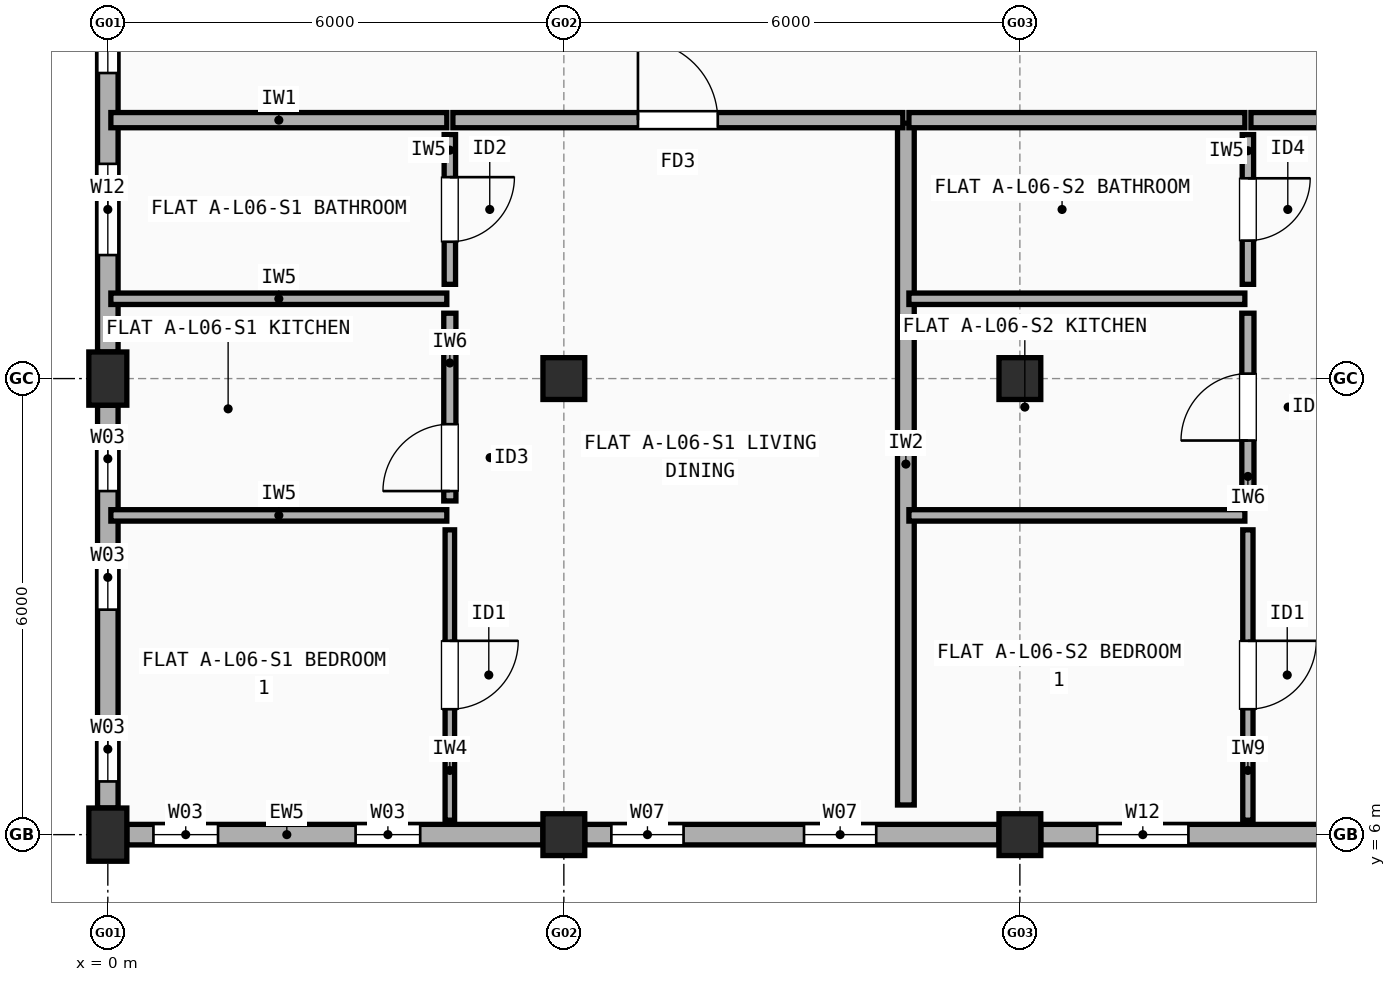
"""IFC4 building model, lengths in metres.
Left out: names, types, materials, properties, quantities, classifications, styles, units other than length and angle.
Written with IfcOpenShell. Run it as: python <this file> out.ifc"""

import sys

from ifc_helpers import new_model, si_unit, direction, frame, frame_2d, origin, origin_2d, place, context, subcontext, project, spatial, rectangle, extrude, element, fill, save


model = new_model("IFC4")
c1 = context("Model", 3, precision=1e-05, world=origin(), true_north=direction((0.0, 1.0)))
c2 = subcontext(c1, "Body", "Model", "MODEL_VIEW")
j1 = project(units=[si_unit("LENGTHUNIT", "METRE"), si_unit("PLANEANGLEUNIT", "RADIAN")], contexts=[c1])
p1 = place(None, origin())
s1 = spatial("IfcSite", under=j1, at=p1, CompositionType="ELEMENT")
p2 = place(p1, origin())
s2 = spatial("IfcBuilding", under=s1, at=p2, CompositionType="ELEMENT")
p3 = place(p2, frame((0.0, 0.0, 20.5)))
s3 = spatial("IfcBuildingStorey", under=s2, at=p3, CompositionType="ELEMENT", Elevation=20.5)
for number, where, z_axis, x_axis in (
    (1, (0.0, 6.0, 0.0), (0.0, 0.0, 1.0), (1.0, 0.0, 0.0)),
    (2, (0.0, 12.0, 0.0), (0.0, 0.0, 1.0), (1.0, 0.0, 0.0)),
):
    element("IfcColumn", number, at=place(p3, frame(where, z_axis=z_axis, x_axis=x_axis)), inside=s3, PredefinedType="COLUMN", context=c2, shape_type="SweptSolid", body=[
        extrude(rectangle(XDim=0.5, YDim=0.7, at=origin_2d()), origin(), (0.0, 0.0, 1.0), 2.97),
    ])
for number, where, z_axis, x_axis in (
    (3, (6.0, 6.0, 0.0), (0.0, 0.0, 1.0), (1.0, 0.0, 0.0)),
    (4, (6.0, 12.0, 0.0), (0.0, 0.0, 1.0), (1.0, 0.0, 0.0)),
    (5, (12.0, 6.0, 0.0), (0.0, 0.0, 1.0), (1.0, 0.0, 0.0)),
    (6, (12.0, 12.0, 0.0), (0.0, 0.0, 1.0), (1.0, 0.0, 0.0)),
):
    element("IfcColumn", number, at=place(p3, frame(where, z_axis=z_axis, x_axis=x_axis)), inside=s3, PredefinedType="COLUMN", context=c2, shape_type="SweptSolid", body=[
        extrude(rectangle(XDim=0.55, YDim=0.55, at=origin_2d()), origin(), (0.0, 0.0, 1.0), 2.97),
    ])
p4 = place(p3, frame((0.25, 6.0, 0.0), z_axis=(0.0, 0.0, 1.0), x_axis=(1.0, 0.0, 0.0)))
e7 = element("IfcWall", 7, at=p4, inside=s3, PredefinedType="STANDARD", context=c2, shape_type="SweptSolid", body=[
    extrude(rectangle(XDim=5.475, YDim=0.27, at=frame_2d((2.738, 0.0))), origin(), (0.0, 0.0, 1.0), 2.452),
])
p5 = place(p4, frame((0.35, 0.0, 0.9)))
e8 = element("IfcOpeningElement", 8, at=p5, cuts=e7, PredefinedType="OPENING", context=c2, shape_type="SweptSolid", body=[
    extrude(rectangle(XDim=0.85, YDim=1.25, at=frame_2d((0.425, 0.625))), frame((0.0, 0.145, 0.0), z_axis=(0.0, -1.0, 0.0), x_axis=(1.0, 0.0, 0.0)), (0.0, 0.0, 1.0), 0.29),
])
p6 = place(p4, frame((3.01, 0.0, 0.9)))
e9 = element("IfcOpeningElement", 9, at=p6, cuts=e7, PredefinedType="OPENING", context=c2, shape_type="SweptSolid", body=[
    extrude(rectangle(XDim=0.85, YDim=1.25, at=frame_2d((0.425, 0.625))), frame((0.0, 0.145, 0.0), z_axis=(0.0, -1.0, 0.0), x_axis=(1.0, 0.0, 0.0)), (0.0, 0.0, 1.0), 0.29),
])
p7 = place(p3, frame((6.275, 6.0, 0.0), z_axis=(0.0, 0.0, 1.0), x_axis=(1.0, 0.0, 0.0)))
e10 = element("IfcWall", 10, at=p7, inside=s3, PredefinedType="STANDARD", context=c2, shape_type="SweptSolid", body=[
    extrude(rectangle(XDim=5.45, YDim=0.27, at=frame_2d((2.725, 0.0))), origin(), (0.0, 0.0, 1.0), 2.452),
])
p8 = place(p7, frame((0.35, 0.0, 0.9)))
e11 = element("IfcOpeningElement", 11, at=p8, cuts=e10, PredefinedType="OPENING", context=c2, shape_type="SweptSolid", body=[
    extrude(rectangle(XDim=0.95, YDim=1.35, at=frame_2d((0.475, 0.675))), frame((0.0, 0.145, 0.0), z_axis=(0.0, -1.0, 0.0), x_axis=(1.0, 0.0, 0.0)), (0.0, 0.0, 1.0), 0.29),
])
p9 = place(p7, frame((2.885, 0.0, 0.9)))
e12 = element("IfcOpeningElement", 12, at=p9, cuts=e10, PredefinedType="OPENING", context=c2, shape_type="SweptSolid", body=[
    extrude(rectangle(XDim=0.95, YDim=1.35, at=frame_2d((0.475, 0.675))), frame((0.0, 0.145, 0.0), z_axis=(0.0, -1.0, 0.0), x_axis=(1.0, 0.0, 0.0)), (0.0, 0.0, 1.0), 0.29),
])
p10 = place(p3, frame((12.275, 6.0, 0.0), z_axis=(0.0, 0.0, 1.0), x_axis=(1.0, 0.0, 0.0)))
e13 = element("IfcWall", 13, at=p10, inside=s3, PredefinedType="STANDARD", context=c2, shape_type="SweptSolid", body=[
    extrude(rectangle(XDim=5.45, YDim=0.27, at=frame_2d((2.725, 0.0))), origin(), (0.0, 0.0, 1.0), 2.452),
])
p11 = place(p10, frame((0.742, 0.0, 0.9)))
e14 = element("IfcOpeningElement", 14, at=p11, cuts=e13, PredefinedType="OPENING", context=c2, shape_type="SweptSolid", body=[
    extrude(rectangle(XDim=1.2, YDim=1.35, at=frame_2d((0.6, 0.675))), frame((0.0, 0.145, 0.0), z_axis=(0.0, -1.0, 0.0), x_axis=(1.0, 0.0, 0.0)), (0.0, 0.0, 1.0), 0.29),
])
p12 = place(p10, frame((3.708, 0.0, 0.9)))
e15 = element("IfcOpeningElement", 15, at=p12, cuts=e13, PredefinedType="OPENING", context=c2, shape_type="SweptSolid", body=[
    extrude(rectangle(XDim=0.8, YDim=1.2, at=frame_2d((0.4, 0.6))), frame((0.0, 0.145, 0.0), z_axis=(0.0, -1.0, 0.0), x_axis=(1.0, 0.0, 0.0)), (0.0, 0.0, 1.0), 0.29),
])
p13 = place(p3, frame((0.0, 17.65, 0.0), z_axis=(0.0, 0.0, 1.0), x_axis=(0.0, -1.0, 0.0)))
e16 = element("IfcWall", 16, at=p13, inside=s3, PredefinedType="STANDARD", context=c2, shape_type="SweptSolid", body=[
    extrude(rectangle(XDim=5.3, YDim=0.27, at=frame_2d((2.65, 0.0))), origin(), (0.0, 0.0, 1.0), 2.452),
])
p14 = place(p13, frame((0.58, 0.0, 0.9)))
e17 = element("IfcOpeningElement", 17, at=p14, cuts=e16, PredefinedType="OPENING", context=c2, shape_type="SweptSolid", body=[
    extrude(rectangle(XDim=1.05, YDim=1.35, at=frame_2d((0.525, 0.675))), frame((0.0, 0.145, 0.0), z_axis=(0.0, -1.0, 0.0), x_axis=(1.0, 0.0, 0.0)), (0.0, 0.0, 1.0), 0.29),
])
p15 = place(p13, frame((2.825, 0.0, 0.9)))
e18 = element("IfcOpeningElement", 18, at=p15, cuts=e16, PredefinedType="OPENING", context=c2, shape_type="SweptSolid", body=[
    extrude(rectangle(XDim=1.2, YDim=1.35, at=frame_2d((0.6, 0.675))), frame((0.0, 0.145, 0.0), z_axis=(0.0, -1.0, 0.0), x_axis=(1.0, 0.0, 0.0)), (0.0, 0.0, 1.0), 0.29),
])
p16 = place(p3, frame((0.0, 11.65, 0.0), z_axis=(0.0, 0.0, 1.0), x_axis=(0.0, -1.0, 0.0)))
e19 = element("IfcWall", 19, at=p16, inside=s3, PredefinedType="STANDARD", context=c2, shape_type="SweptSolid", body=[
    extrude(rectangle(XDim=5.3, YDim=0.27, at=frame_2d((2.65, 0.0))), origin(), (0.0, 0.0, 1.0), 2.452),
])
p17 = place(p16, frame((0.28, 0.0, 0.9)))
e20 = element("IfcOpeningElement", 20, at=p17, cuts=e19, PredefinedType="OPENING", context=c2, shape_type="SweptSolid", body=[
    extrude(rectangle(XDim=0.85, YDim=1.25, at=frame_2d((0.425, 0.625))), frame((0.0, 0.145, 0.0), z_axis=(0.0, -1.0, 0.0), x_axis=(1.0, 0.0, 0.0)), (0.0, 0.0, 1.0), 0.29),
])
p18 = place(p16, frame((1.84, 0.0, 0.9)))
e21 = element("IfcOpeningElement", 21, at=p18, cuts=e19, PredefinedType="OPENING", context=c2, shape_type="SweptSolid", body=[
    extrude(rectangle(XDim=0.85, YDim=1.25, at=frame_2d((0.425, 0.625))), frame((0.0, 0.145, 0.0), z_axis=(0.0, -1.0, 0.0), x_axis=(1.0, 0.0, 0.0)), (0.0, 0.0, 1.0), 0.29),
])
p19 = place(p16, frame((4.1, 0.0, 0.9)))
e22 = element("IfcOpeningElement", 22, at=p19, cuts=e19, PredefinedType="OPENING", context=c2, shape_type="SweptSolid", body=[
    extrude(rectangle(XDim=0.85, YDim=1.25, at=frame_2d((0.425, 0.625))), frame((0.0, 0.145, 0.0), z_axis=(0.0, -1.0, 0.0), x_axis=(1.0, 0.0, 0.0)), (0.0, 0.0, 1.0), 0.29),
])
p20 = place(p3, frame((10.5, 6.39, 0.0), z_axis=(0.0, 0.0, 1.0), x_axis=(0.0, 1.0, 0.0)))
e23 = element("IfcWall", 23, at=p20, inside=s3, PredefinedType="SOLIDWALL", context=c2, shape_type="SweptSolid", body=[
    extrude(rectangle(XDim=8.97, YDim=0.22, at=frame_2d((4.485, 0.0))), origin(), (0.0, 0.0, 1.0), 2.508),
])
p21 = place(p3, frame((0.04, 15.4, 0.0), z_axis=(0.0, 0.0, 1.0), x_axis=(1.0, 0.0, 0.0)))
e24 = element("IfcWall", 24, at=p21, inside=s3, PredefinedType="SOLIDWALL", context=c2, shape_type="SweptSolid", body=[
    extrude(rectangle(XDim=4.42, YDim=0.2, at=frame_2d((2.21, 0.0))), origin(), (0.0, 0.0, 1.0), 2.452),
])
p22 = place(p3, frame((4.54, 15.4, 0.0), z_axis=(0.0, 0.0, 1.0), x_axis=(1.0, 0.0, 0.0)))
e25 = element("IfcWall", 25, at=p22, inside=s3, PredefinedType="SOLIDWALL", context=c2, shape_type="SweptSolid", body=[
    extrude(rectangle(XDim=5.92, YDim=0.2, at=frame_2d((2.96, 0.0))), origin(), (0.0, 0.0, 1.0), 2.548),
])
p23 = place(p22, frame((2.435, 0.0, 0.0)))
e26 = element("IfcOpeningElement", 26, at=p23, cuts=e25, PredefinedType="OPENING", context=c2, shape_type="SweptSolid", body=[
    extrude(rectangle(XDim=1.05, YDim=2.15, at=frame_2d((0.525, 1.075))), frame((0.0, 0.11, 0.0), z_axis=(0.0, -1.0, 0.0), x_axis=(1.0, 0.0, 0.0)), (0.0, 0.0, 1.0), 0.22),
])
p24 = place(p3, frame((4.5, 6.19, 0.0), z_axis=(0.0, 0.0, 1.0), x_axis=(0.0, 1.0, 0.0)))
e27 = element("IfcWall", 27, at=p24, inside=s3, PredefinedType="PARTITIONING", context=c2, shape_type="SweptSolid", body=[
    extrude(rectangle(XDim=3.82, YDim=0.125, at=frame_2d((1.91, 0.0))), origin(), (0.0, 0.0, 1.0), 2.97),
])
p25 = place(p24, frame((1.46, 0.0, 0.0)))
e28 = element("IfcOpeningElement", 28, at=p25, cuts=e27, PredefinedType="OPENING", context=c2, shape_type="SweptSolid", body=[
    extrude(rectangle(XDim=0.9, YDim=2.1, at=frame_2d((0.45, 1.05))), frame((0.0, 0.073, 0.0), z_axis=(0.0, -1.0, 0.0), x_axis=(1.0, 0.0, 0.0)), (0.0, 0.0, 1.0), 0.145),
])
p26 = place(p3, frame((4.5, 10.39, 0.0), z_axis=(0.0, 0.0, 1.0), x_axis=(0.0, 1.0, 0.0)))
e29 = element("IfcWall", 29, at=p26, inside=s3, PredefinedType="PLUMBINGWALL", context=c2, shape_type="SweptSolid", body=[
    extrude(rectangle(XDim=2.47, YDim=0.16, at=frame_2d((1.235, 0.0))), origin(), (0.0, 0.0, 1.0), 2.548),
])
p27 = place(p26, frame((0.13, 0.0, 0.0)))
e30 = element("IfcOpeningElement", 30, at=p27, cuts=e29, PredefinedType="OPENING", context=c2, shape_type="SweptSolid", body=[
    extrude(rectangle(XDim=0.88, YDim=2.1, at=frame_2d((0.44, 1.05))), frame((0.0, 0.09, 0.0), z_axis=(0.0, -1.0, 0.0), x_axis=(1.0, 0.0, 0.0)), (0.0, 0.0, 1.0), 0.18),
])
p28 = place(p3, frame((4.5, 13.24, 0.0), z_axis=(0.0, 0.0, 1.0), x_axis=(0.0, 1.0, 0.0)))
e31 = element("IfcWall", 31, at=p28, inside=s3, PredefinedType="PARTITIONING", context=c2, shape_type="SweptSolid", body=[
    extrude(rectangle(XDim=1.97, YDim=0.15, at=frame_2d((0.985, 0.0))), origin(), (0.0, 0.0, 1.0), 2.97),
])
p29 = place(p28, frame((0.56, 0.0, 0.0)))
e32 = element("IfcOpeningElement", 32, at=p29, cuts=e31, PredefinedType="OPENING", context=c2, shape_type="SweptSolid", body=[
    extrude(rectangle(XDim=0.85, YDim=2.1, at=frame_2d((0.425, 1.05))), frame((0.0, 0.085, 0.0), z_axis=(0.0, -1.0, 0.0), x_axis=(1.0, 0.0, 0.0)), (0.0, 0.0, 1.0), 0.17),
])
for number, where, z_axis, x_axis in (
    (33, (0.04, 10.2, 0.0), (0.0, 0.0, 1.0), (1.0, 0.0, 0.0)),
    (34, (0.04, 13.05, 0.0), (0.0, 0.0, 1.0), (1.0, 0.0, 0.0)),
):
    element("IfcWall", number, at=place(p3, frame(where, z_axis=z_axis, x_axis=x_axis)), inside=s3, PredefinedType="PARTITIONING", context=c2, shape_type="SweptSolid", body=[
        extrude(rectangle(XDim=4.42, YDim=0.15, at=frame_2d((2.21, 0.0))), origin(), (0.0, 0.0, 1.0), 2.452),
    ])
p30 = place(p3, frame((10.54, 15.4, 0.0), z_axis=(0.0, 0.0, 1.0), x_axis=(1.0, 0.0, 0.0)))
e35 = element("IfcWall", 35, at=p30, inside=s3, PredefinedType="SOLIDWALL", context=c2, shape_type="SweptSolid", body=[
    extrude(rectangle(XDim=4.42, YDim=0.2, at=frame_2d((2.21, 0.0))), origin(), (0.0, 0.0, 1.0), 2.548),
])
p31 = place(p3, frame((15.04, 15.4, 0.0), z_axis=(0.0, 0.0, 1.0), x_axis=(1.0, 0.0, 0.0)))
e36 = element("IfcWall", 36, at=p31, inside=s3, PredefinedType="SOLIDWALL", context=c2, shape_type="SweptSolid", body=[
    extrude(rectangle(XDim=5.92, YDim=0.2, at=frame_2d((2.96, 0.0))), origin(), (0.0, 0.0, 1.0), 2.508),
])
p32 = place(p31, frame((2.46, 0.0, 0.0)))
e37 = element("IfcOpeningElement", 37, at=p32, cuts=e36, PredefinedType="OPENING", context=c2, shape_type="SweptSolid", body=[
    extrude(rectangle(XDim=1.0, YDim=2.15, at=frame_2d((0.5, 1.075))), frame((0.0, 0.11, 0.0), z_axis=(0.0, -1.0, 0.0), x_axis=(1.0, 0.0, 0.0)), (0.0, 0.0, 1.0), 0.22),
])
p33 = place(p3, frame((15.0, 6.19, 0.0), z_axis=(0.0, 0.0, 1.0), x_axis=(0.0, 1.0, 0.0)))
e38 = element("IfcWall", 38, at=p33, inside=s3, PredefinedType="PARTITIONING", context=c2, shape_type="SweptSolid", body=[
    extrude(rectangle(XDim=3.82, YDim=0.135, at=frame_2d((1.91, 0.0))), origin(), (0.0, 0.0, 1.0), 2.97),
])
p34 = place(p33, frame((1.46, 0.0, 0.0)))
e39 = element("IfcOpeningElement", 39, at=p34, cuts=e38, PredefinedType="OPENING", context=c2, shape_type="SweptSolid", body=[
    extrude(rectangle(XDim=0.9, YDim=2.1, at=frame_2d((0.45, 1.05))), frame((0.0, 0.077, 0.0), z_axis=(0.0, -1.0, 0.0), x_axis=(1.0, 0.0, 0.0)), (0.0, 0.0, 1.0), 0.155),
])
p35 = place(p3, frame((15.0, 10.39, 0.0), z_axis=(0.0, 0.0, 1.0), x_axis=(0.0, 1.0, 0.0)))
e40 = element("IfcWall", 40, at=p35, inside=s3, PredefinedType="PLUMBINGWALL", context=c2, shape_type="SweptSolid", body=[
    extrude(rectangle(XDim=2.47, YDim=0.16, at=frame_2d((1.235, 0.0))), origin(), (0.0, 0.0, 1.0), 2.408),
])
p36 = place(p35, frame((0.795, 0.0, 0.0)))
e41 = element("IfcOpeningElement", 41, at=p36, cuts=e40, PredefinedType="OPENING", context=c2, shape_type="SweptSolid", body=[
    extrude(rectangle(XDim=0.88, YDim=2.1, at=frame_2d((0.44, 1.05))), frame((0.0, 0.09, 0.0), z_axis=(0.0, -1.0, 0.0), x_axis=(1.0, 0.0, 0.0)), (0.0, 0.0, 1.0), 0.18),
])
p37 = place(p3, frame((15.0, 13.24, 0.0), z_axis=(0.0, 0.0, 1.0), x_axis=(0.0, 1.0, 0.0)))
e42 = element("IfcWall", 42, at=p37, inside=s3, PredefinedType="PARTITIONING", context=c2, shape_type="SweptSolid", body=[
    extrude(rectangle(XDim=1.97, YDim=0.15, at=frame_2d((0.985, 0.0))), origin(), (0.0, 0.0, 1.0), 2.97),
])
p38 = place(p37, frame((0.575, 0.0, 0.0)))
e43 = element("IfcOpeningElement", 43, at=p38, cuts=e42, PredefinedType="OPENING", context=c2, shape_type="SweptSolid", body=[
    extrude(rectangle(XDim=0.82, YDim=2.08, at=frame_2d((0.41, 1.04))), frame((0.0, 0.085, 0.0), z_axis=(0.0, -1.0, 0.0), x_axis=(1.0, 0.0, 0.0)), (0.0, 0.0, 1.0), 0.17),
])
p39 = place(p3, frame((10.54, 10.2, 0.0), z_axis=(0.0, 0.0, 1.0), x_axis=(1.0, 0.0, 0.0)))
e44 = element("IfcWall", 44, at=p39, inside=s3, PredefinedType="PARTITIONING", context=c2, shape_type="SweptSolid", body=[
    extrude(rectangle(XDim=4.42, YDim=0.15, at=frame_2d((2.21, 0.0))), origin(), (0.0, 0.0, 1.0), 2.458),
])
p40 = place(p3, frame((10.54, 13.05, 0.0), z_axis=(0.0, 0.0, 1.0), x_axis=(1.0, 0.0, 0.0)))
e45 = element("IfcWall", 45, at=p40, inside=s3, PredefinedType="PARTITIONING", context=c2, shape_type="SweptSolid", body=[
    extrude(rectangle(XDim=4.42, YDim=0.15, at=frame_2d((2.21, 0.0))), origin(), (0.0, 0.0, 1.0), 2.548),
])
p41 = place(p5, origin())
e46 = element("IfcWindow", 46, at=p41, inside=s3, PartitioningType="SINGLE_PANEL", PredefinedType="WINDOW", context=c2, shape_type="SweptSolid", body=[
    extrude(rectangle(XDim=0.85, YDim=1.25, at=frame_2d((0.425, 0.625))), frame((0.0, 0.03, 0.0), z_axis=(0.0, -1.0, 0.0), x_axis=(1.0, 0.0, 0.0)), (0.0, 0.0, 1.0), 0.06),
])
fill(e8, e46)
p42 = place(p6, origin())
e47 = element("IfcWindow", 47, at=p42, inside=s3, PartitioningType="SINGLE_PANEL", PredefinedType="WINDOW", context=c2, shape_type="SweptSolid", body=[
    extrude(rectangle(XDim=0.85, YDim=1.25, at=frame_2d((0.425, 0.625))), frame((0.0, 0.03, 0.0), z_axis=(0.0, -1.0, 0.0), x_axis=(1.0, 0.0, 0.0)), (0.0, 0.0, 1.0), 0.06),
])
fill(e9, e47)
p43 = place(p8, origin())
e48 = element("IfcWindow", 48, at=p43, inside=s3, PartitioningType="SINGLE_PANEL", PredefinedType="WINDOW", context=c2, shape_type="SweptSolid", body=[
    extrude(rectangle(XDim=0.95, YDim=1.35, at=frame_2d((0.475, 0.675))), frame((0.0, 0.03, 0.0), z_axis=(0.0, -1.0, 0.0), x_axis=(1.0, 0.0, 0.0)), (0.0, 0.0, 1.0), 0.06),
])
fill(e11, e48)
p44 = place(p9, origin())
e49 = element("IfcWindow", 49, at=p44, inside=s3, PartitioningType="SINGLE_PANEL", PredefinedType="WINDOW", context=c2, shape_type="SweptSolid", body=[
    extrude(rectangle(XDim=0.95, YDim=1.35, at=frame_2d((0.475, 0.675))), frame((0.0, 0.03, 0.0), z_axis=(0.0, -1.0, 0.0), x_axis=(1.0, 0.0, 0.0)), (0.0, 0.0, 1.0), 0.06),
])
fill(e12, e49)
p45 = place(p11, origin())
e50 = element("IfcWindow", 50, at=p45, inside=s3, PartitioningType="SINGLE_PANEL", PredefinedType="WINDOW", context=c2, shape_type="SweptSolid", body=[
    extrude(rectangle(XDim=1.2, YDim=1.35, at=frame_2d((0.6, 0.675))), frame((0.0, 0.03, 0.0), z_axis=(0.0, -1.0, 0.0), x_axis=(1.0, 0.0, 0.0)), (0.0, 0.0, 1.0), 0.06),
])
fill(e14, e50)
p46 = place(p14, origin())
e51 = element("IfcWindow", 51, at=p46, inside=s3, PartitioningType="SINGLE_PANEL", PredefinedType="WINDOW", context=c2, shape_type="SweptSolid", body=[
    extrude(rectangle(XDim=1.05, YDim=1.35, at=frame_2d((0.525, 0.675))), frame((0.0, 0.03, 0.0), z_axis=(0.0, -1.0, 0.0), x_axis=(1.0, 0.0, 0.0)), (0.0, 0.0, 1.0), 0.06),
])
fill(e17, e51)
p47 = place(p15, origin())
e52 = element("IfcWindow", 52, at=p47, inside=s3, PartitioningType="SINGLE_PANEL", PredefinedType="WINDOW", context=c2, shape_type="SweptSolid", body=[
    extrude(rectangle(XDim=1.2, YDim=1.35, at=frame_2d((0.6, 0.675))), frame((0.0, 0.03, 0.0), z_axis=(0.0, -1.0, 0.0), x_axis=(1.0, 0.0, 0.0)), (0.0, 0.0, 1.0), 0.06),
])
fill(e18, e52)
p48 = place(p17, origin())
e53 = element("IfcWindow", 53, at=p48, inside=s3, PartitioningType="SINGLE_PANEL", PredefinedType="WINDOW", context=c2, shape_type="SweptSolid", body=[
    extrude(rectangle(XDim=0.85, YDim=1.25, at=frame_2d((0.425, 0.625))), frame((0.0, 0.03, 0.0), z_axis=(0.0, -1.0, 0.0), x_axis=(1.0, 0.0, 0.0)), (0.0, 0.0, 1.0), 0.06),
])
fill(e20, e53)
p49 = place(p18, origin())
e54 = element("IfcWindow", 54, at=p49, inside=s3, PartitioningType="SINGLE_PANEL", PredefinedType="WINDOW", context=c2, shape_type="SweptSolid", body=[
    extrude(rectangle(XDim=0.85, YDim=1.25, at=frame_2d((0.425, 0.625))), frame((0.0, 0.03, 0.0), z_axis=(0.0, -1.0, 0.0), x_axis=(1.0, 0.0, 0.0)), (0.0, 0.0, 1.0), 0.06),
])
fill(e21, e54)
p50 = place(p19, origin())
e55 = element("IfcWindow", 55, at=p50, inside=s3, PartitioningType="SINGLE_PANEL", PredefinedType="WINDOW", context=c2, shape_type="SweptSolid", body=[
    extrude(rectangle(XDim=0.85, YDim=1.25, at=frame_2d((0.425, 0.625))), frame((0.0, 0.03, 0.0), z_axis=(0.0, -1.0, 0.0), x_axis=(1.0, 0.0, 0.0)), (0.0, 0.0, 1.0), 0.06),
])
fill(e22, e55)
p51 = place(p23, origin())
e56 = element("IfcDoor", 56, at=p51, inside=s3, OperationType="SINGLE_SWING_LEFT", PredefinedType="DOOR", context=c2, shape_type="SweptSolid", body=[
    extrude(rectangle(XDim=1.05, YDim=2.15, at=frame_2d((0.525, 1.075))), frame((0.0, 0.025, 0.0), z_axis=(0.0, -1.0, 0.0), x_axis=(1.0, 0.0, 0.0)), (0.0, 0.0, 1.0), 0.05),
])
fill(e26, e56)
p52 = place(p25, origin())
e57 = element("IfcDoor", 57, at=p52, inside=s3, OperationType="SINGLE_SWING_RIGHT", PredefinedType="DOOR", context=c2, shape_type="SweptSolid", body=[
    extrude(rectangle(XDim=0.9, YDim=2.1, at=frame_2d((0.45, 1.05))), frame((0.0, 0.025, 0.0), z_axis=(0.0, -1.0, 0.0), x_axis=(1.0, 0.0, 0.0)), (0.0, 0.0, 1.0), 0.05),
])
fill(e28, e57)
p53 = place(p27, origin())
e58 = element("IfcDoor", 58, at=p53, inside=s3, OperationType="SINGLE_SWING_LEFT", PredefinedType="DOOR", context=c2, shape_type="SweptSolid", body=[
    extrude(rectangle(XDim=0.88, YDim=2.1, at=frame_2d((0.44, 1.05))), frame((0.0, 0.025, 0.0), z_axis=(0.0, -1.0, 0.0), x_axis=(1.0, 0.0, 0.0)), (0.0, 0.0, 1.0), 0.05),
])
fill(e30, e58)
p54 = place(p29, origin())
e59 = element("IfcDoor", 59, at=p54, inside=s3, OperationType="SINGLE_SWING_RIGHT", PredefinedType="DOOR", context=c2, shape_type="SweptSolid", body=[
    extrude(rectangle(XDim=0.85, YDim=2.1, at=frame_2d((0.425, 1.05))), frame((0.0, 0.025, 0.0), z_axis=(0.0, -1.0, 0.0), x_axis=(1.0, 0.0, 0.0)), (0.0, 0.0, 1.0), 0.05),
])
fill(e32, e59)
p55 = place(p34, origin())
e60 = element("IfcDoor", 60, at=p55, inside=s3, OperationType="SINGLE_SWING_RIGHT", PredefinedType="DOOR", context=c2, shape_type="SweptSolid", body=[
    extrude(rectangle(XDim=0.9, YDim=2.1, at=frame_2d((0.45, 1.05))), frame((0.0, 0.025, 0.0), z_axis=(0.0, -1.0, 0.0), x_axis=(1.0, 0.0, 0.0)), (0.0, 0.0, 1.0), 0.05),
])
fill(e39, e60)
p56 = place(p36, origin())
e61 = element("IfcDoor", 61, at=p56, inside=s3, OperationType="SINGLE_SWING_LEFT", PredefinedType="DOOR", context=c2, shape_type="SweptSolid", body=[
    extrude(rectangle(XDim=0.88, YDim=2.1, at=frame_2d((0.44, 1.05))), frame((0.0, 0.025, 0.0), z_axis=(0.0, -1.0, 0.0), x_axis=(1.0, 0.0, 0.0)), (0.0, 0.0, 1.0), 0.05),
])
fill(e41, e61)
p57 = place(p38, origin())
e62 = element("IfcDoor", 62, at=p57, inside=s3, OperationType="SINGLE_SWING_RIGHT", PredefinedType="DOOR", context=c2, shape_type="SweptSolid", body=[
    extrude(rectangle(XDim=0.82, YDim=2.08, at=frame_2d((0.41, 1.04))), frame((0.0, 0.025, 0.0), z_axis=(0.0, -1.0, 0.0), x_axis=(1.0, 0.0, 0.0)), (0.0, 0.0, 1.0), 0.05),
])
fill(e43, e62)
save(model, sys.argv[1])
